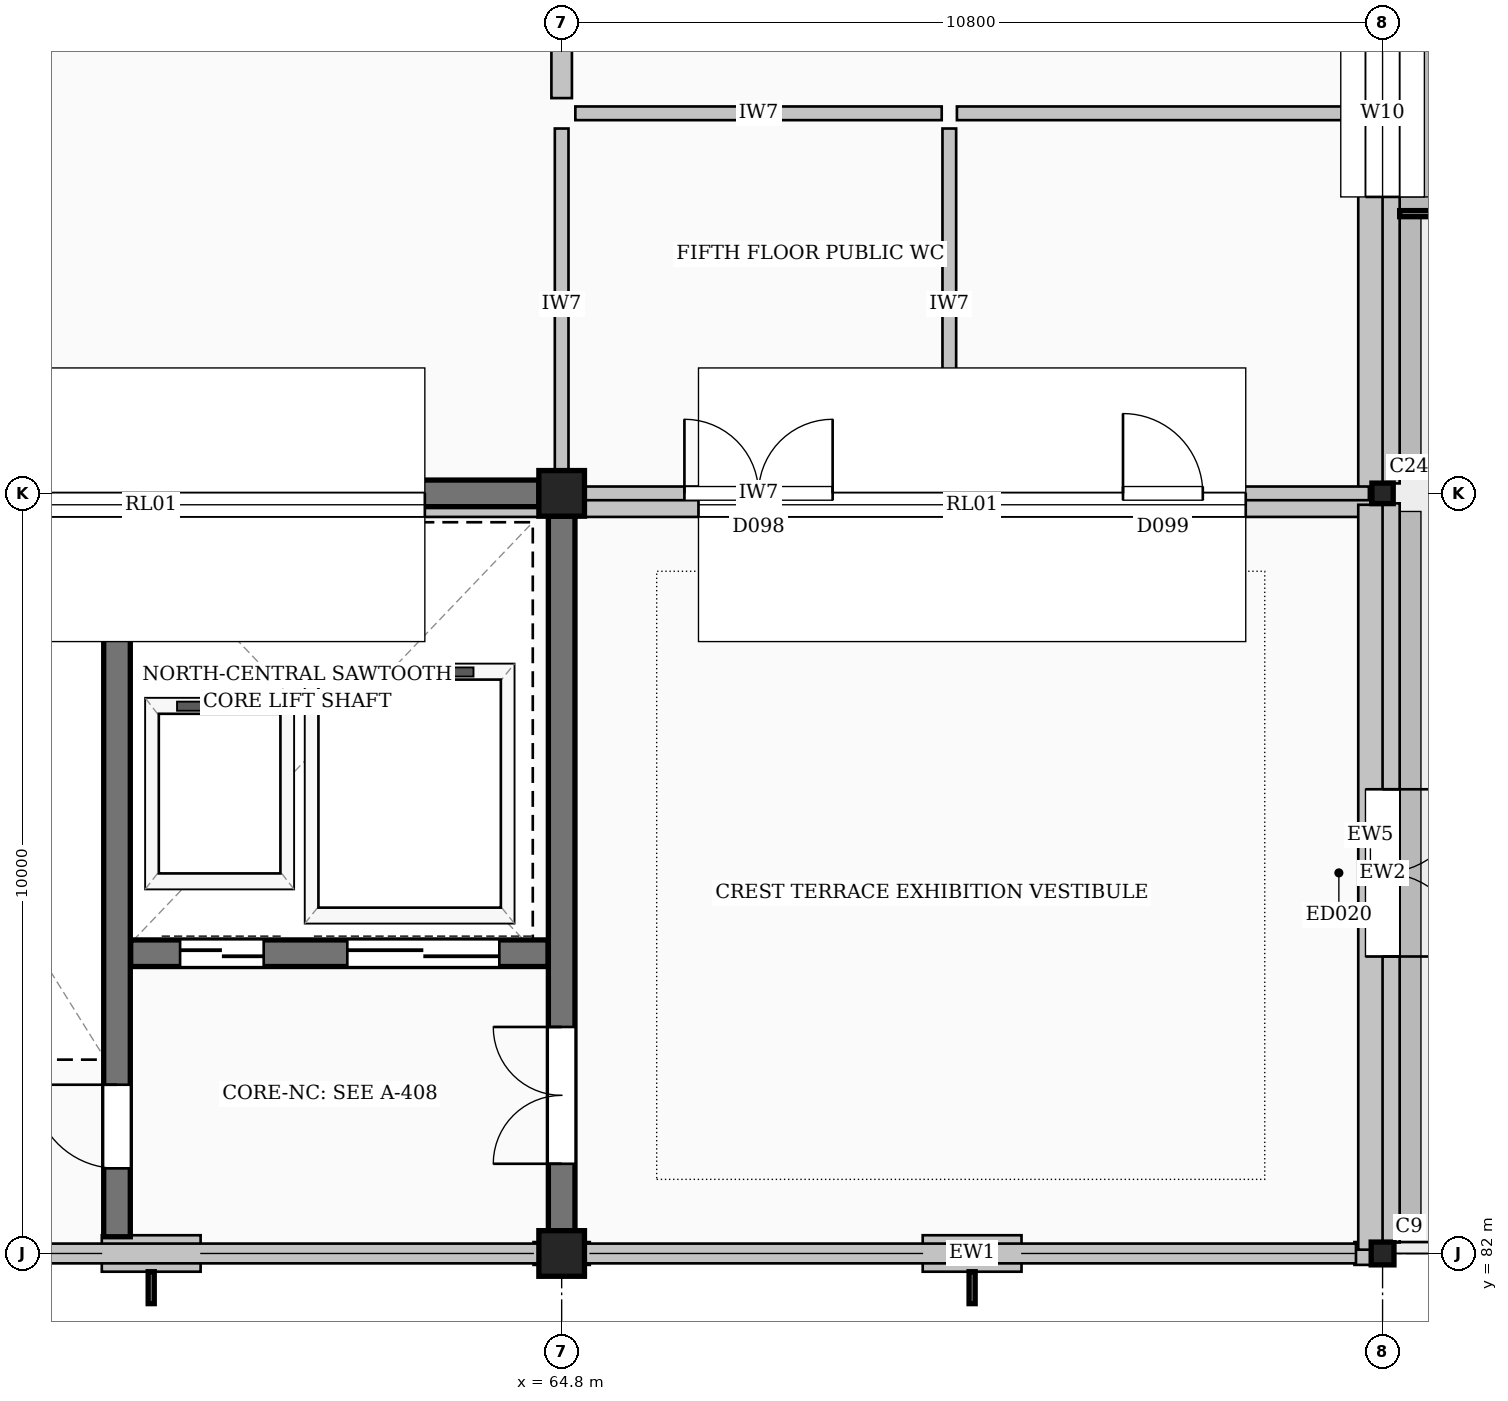
"""IFC4 building model, lengths in metres.
Left out: names, types, materials, properties, quantities, classifications, styles, units other than length and angle.
Written with IfcOpenShell. Run it as: python <this file> out.ifc"""

import sys

from ifc_helpers import new_model, si_unit, direction, frame, frame_2d, origin, origin_2d, place, context, subcontext, project, spatial, polyline, rectangle, hollow_rectangle, i_section, outline, extrude, element, fill, save


model = new_model("IFC4")
c1 = context("Model", 3, precision=1e-05, world=origin(), true_north=direction((0.0, 1.0)))
c2 = subcontext(c1, "Body", "Model", "MODEL_VIEW")
j1 = project(units=[si_unit("LENGTHUNIT", "METRE"), si_unit("PLANEANGLEUNIT", "RADIAN")], contexts=[c1])
p1 = place(None, origin())
s1 = spatial("IfcSite", under=j1, at=p1, CompositionType="ELEMENT")
p2 = place(p1, origin())
s2 = spatial("IfcBuilding", under=s1, at=p2, CompositionType="ELEMENT")
p3 = place(p2, frame((0.0, 0.0, 28.8)))
s3 = spatial("IfcBuildingStorey", under=s2, at=p3, CompositionType="ELEMENT", Elevation=28.8)
for number, where, z_axis, x_axis in (
    (1, (64.8, 82.0, 0.0), (0.0, 0.0, 1.0), (1.0, 0.0, 0.0)),
    (2, (64.8, 92.0, 0.0), (0.0, 0.0, 1.0), (1.0, 0.0, 0.0)),
):
    element("IfcColumn", number, at=place(p3, frame(where, z_axis=z_axis, x_axis=x_axis)), inside=s3, PredefinedType="COLUMN", context=c2, shape_type="SweptSolid", body=[
        extrude(rectangle(XDim=0.6, YDim=0.6, at=origin_2d()), origin(), (0.0, 0.0, 1.0), 5.4),
    ])
p4 = place(p3, frame((75.6, 82.0, 0.0), z_axis=(0.0, 0.0, 1.0), x_axis=(1.0, 0.0, 0.0)))
e3 = element("IfcColumn", 3, at=p4, inside=s3, PredefinedType="COLUMN", context=c2, shape_type="SweptSolid", body=[
    extrude(hollow_rectangle(XDim=0.3, YDim=0.3, WallThickness=0.016, InnerFilletRadius=0.016, OuterFilletRadius=0.032, at=origin_2d()), origin(), (0.0, 0.0, 1.0), 5.4),
])
p5 = place(p3, frame((75.6, 92.0, 0.0), z_axis=(0.0, 0.0, 1.0), x_axis=(1.0, 0.0, 0.0)))
e4 = element("IfcColumn", 4, at=p5, inside=s3, PredefinedType="COLUMN", context=c2, shape_type="SweptSolid", body=[
    extrude(i_section(OverallWidth=0.28, OverallDepth=0.27, WebThickness=0.008, FlangeThickness=0.013, FilletRadius=0.024, at=origin_2d()), origin(), (0.0, 0.0, 1.0), 5.4),
])
p6 = place(p3, frame((75.6, 82.145, 0.0), z_axis=(0.0, 0.0, 1.0), x_axis=(0.0, 1.0, 0.0)))
e5 = element("IfcWall", 5, at=p6, inside=s3, PredefinedType="STANDARD", context=c2, shape_type="SweptSolid", body=[
    extrude(rectangle(XDim=9.724, YDim=0.45, at=frame_2d((4.862, 0.0))), origin(), (0.0, 0.0, 1.0), 5.16),
])
p7 = place(p6, frame((3.762, 0.0, 0.0)))
e6 = element("IfcOpeningElement", 6, at=p7, cuts=e5, PredefinedType="OPENING", context=c2, shape_type="SweptSolid", body=[
    extrude(rectangle(XDim=2.2, YDim=2.4, at=frame_2d((1.1, 1.2))), frame((0.0, 0.235, 0.0), z_axis=(0.0, -1.0, 0.0), x_axis=(1.0, 0.0, 0.0)), (0.0, 0.0, 1.0), 0.47),
])
p8 = place(p3, frame((75.6, 92.131, 0.0), z_axis=(0.0, 0.0, 1.0), x_axis=(0.0, 1.0, 0.0)))
e7 = element("IfcWall", 7, at=p8, inside=s3, PredefinedType="STANDARD", context=c2, shape_type="SweptSolid", body=[
    extrude(rectangle(XDim=9.738, YDim=0.45, at=frame_2d((4.869, 0.0))), origin(), (0.0, 0.0, 1.0), 5.16),
])
p9 = place(p8, frame((3.769, 0.0, 1.0)))
e8 = element("IfcOpeningElement", 8, at=p9, cuts=e7, PredefinedType="OPENING", context=c2, shape_type="SweptSolid", body=[
    extrude(rectangle(XDim=2.2, YDim=3.0, at=frame_2d((1.1, 1.5))), frame((0.0, 0.235, 0.0), z_axis=(0.0, -1.0, 0.0), x_axis=(1.0, 0.0, 0.0)), (0.0, 0.0, 1.0), 0.47),
])
p10 = place(p3, frame((58.75, 82.0, 0.0), z_axis=(0.0, 0.0, 1.0), x_axis=(1.0, 0.0, 0.0)))
e9 = element("IfcWall", 9, at=p10, inside=s3, PredefinedType="STANDARD", context=c2, shape_type="SweptSolid", body=[
    extrude(rectangle(XDim=1.3, YDim=0.48, at=frame_2d((0.65, 0.0))), origin(), (0.0, 0.0, 1.0), 5.044),
])
p11 = place(p3, frame((64.43, 82.0, 0.0), z_axis=(0.0, 0.0, 1.0), x_axis=(1.0, 0.0, 0.0)))
e10 = element("IfcWall", 10, at=p11, inside=s3, PredefinedType="STANDARD", context=c2, shape_type="SweptSolid", body=[
    extrude(rectangle(XDim=0.225, YDim=0.3, at=frame_2d((0.113, 0.0))), origin(), (0.0, 0.0, 1.0), 5.16),
])
p12 = place(p3, frame((69.55, 82.0, 0.0), z_axis=(0.0, 0.0, 1.0), x_axis=(1.0, 0.0, 0.0)))
e11 = element("IfcWall", 11, at=p12, inside=s3, PredefinedType="STANDARD", context=c2, shape_type="SweptSolid", body=[
    extrude(rectangle(XDim=1.3, YDim=0.48, at=frame_2d((0.65, 0.0))), origin(), (0.0, 0.0, 1.0), 5.044),
])
p13 = place(p3, frame((64.945, 82.0, 0.0), z_axis=(0.0, 0.0, 1.0), x_axis=(1.0, 0.0, 0.0)))
e12 = element("IfcWall", 12, at=p13, inside=s3, PredefinedType="STANDARD", context=c2, shape_type="SweptSolid", body=[
    extrude(rectangle(XDim=0.225, YDim=0.3, at=frame_2d((0.112, 0.0))), origin(), (0.0, 0.0, 1.0), 5.16),
])
p14 = place(p3, frame((75.23, 82.0, 0.0), z_axis=(0.0, 0.0, 1.0), x_axis=(1.0, 0.0, 0.0)))
e13 = element("IfcWall", 13, at=p14, inside=s3, PredefinedType="STANDARD", context=c2, shape_type="SweptSolid", body=[
    extrude(rectangle(XDim=0.225, YDim=0.3, at=frame_2d((0.113, 0.0))), origin(), (0.0, 0.0, 1.0), 5.16),
])
p15 = place(p3, frame((54.16, 91.85, 5.4), z_axis=(0.0, 0.0, 1.0), x_axis=(1.0, 0.0, 0.0)))
e14 = element("IfcWall", 14, at=p15, inside=s3, PredefinedType="STANDARD", context=c2, shape_type="SweptSolid", body=[
    extrude(rectangle(XDim=10.48, YDim=0.32, at=frame_2d((5.24, 0.0))), origin(), (0.0, 0.0, 1.0), 2.45),
])
p16 = place(p15, frame((1.64, 0.0, 0.45)))
e15 = element("IfcOpeningElement", 15, at=p16, cuts=e14, PredefinedType="OPENING", context=c2, shape_type="SweptSolid", body=[
    extrude(rectangle(XDim=7.2, YDim=1.5, at=frame_2d((3.6, 0.75))), frame((0.0, 0.17, 0.0), z_axis=(0.0, -1.0, 0.0), x_axis=(1.0, 0.0, 0.0)), (0.0, 0.0, 1.0), 0.34),
])
p17 = place(p3, frame((64.96, 91.85, 5.4), z_axis=(0.0, 0.0, 1.0), x_axis=(1.0, 0.0, 0.0)))
e16 = element("IfcWall", 16, at=p17, inside=s3, PredefinedType="STANDARD", context=c2, shape_type="SweptSolid", body=[
    extrude(rectangle(XDim=10.48, YDim=0.32, at=frame_2d((5.24, 0.0))), origin(), (0.0, 0.0, 1.0), 2.45),
])
p18 = place(p17, frame((1.64, 0.0, 0.45)))
e17 = element("IfcOpeningElement", 17, at=p18, cuts=e16, PredefinedType="OPENING", context=c2, shape_type="SweptSolid", body=[
    extrude(rectangle(XDim=7.2, YDim=1.5, at=frame_2d((3.6, 0.75))), frame((0.0, 0.17, 0.0), z_axis=(0.0, -1.0, 0.0), x_axis=(1.0, 0.0, 0.0)), (0.0, 0.0, 1.0), 0.34),
])
for number, where, z_axis, x_axis in (
    (18, (75.44, 82.05, 5.4), (0.0, 0.0, 1.0), (0.0, 1.0, 0.0)),
    (19, (75.44, 92.05, 5.4), (0.0, 0.0, 1.0), (0.0, 1.0, 0.0)),
):
    element("IfcWall", number, at=place(p3, frame(where, z_axis=z_axis, x_axis=x_axis)), inside=s3, PredefinedType="STANDARD", context=c2, shape_type="SweptSolid", body=[
        extrude(outline(polyline([(0.0, 0.0), (9.8, 0.0), (9.8, 2.55), (0.0, 0.15), (0.0, 0.0)])), frame((0.0, 0.16, 0.0), z_axis=(0.0, -1.0, 0.0), x_axis=(1.0, 0.0, 0.0)), (0.0, 0.0, 1.0), 0.32),
    ])
p19 = place(p3, frame((0.35, 82.0, 5.22), z_axis=(0.0, 0.0, 1.0), x_axis=(1.0, 0.0, 0.0)))
e20 = element("IfcWall", 20, at=p19, inside=s3, PredefinedType="PARAPET", context=c2, shape_type="SweptSolid", body=[
    extrude(rectangle(XDim=74.9, YDim=0.26, at=frame_2d((37.45, 0.0))), origin(), (0.0, 0.0, 1.0), 0.55),
])
p20 = place(p3, frame((54.3, 92.0, 0.0), z_axis=(0.0, 0.0, 1.0), x_axis=(1.0, 0.0, 0.0)))
e21 = element("IfcWall", 21, at=p20, inside=s3, PredefinedType="SHEAR", context=c2, shape_type="SweptSolid", body=[
    extrude(rectangle(XDim=10.2, YDim=0.35, at=frame_2d((5.1, 0.0))), origin(), (0.0, 0.0, 1.0), 5.16),
])
p21 = place(p3, frame((64.8, 82.3, 0.0), z_axis=(0.0, 0.0, 1.0), x_axis=(0.0, 1.0, 0.0)))
e22 = element("IfcWall", 22, at=p21, inside=s3, PredefinedType="SHEAR", context=c2, shape_type="SweptSolid", body=[
    extrude(rectangle(XDim=9.4, YDim=0.35, at=frame_2d((4.7, 0.0))), origin(), (0.0, 0.0, 1.0), 5.16),
])
p22 = place(p21, frame((0.88, 0.0, 0.0)))
e23 = element("IfcOpeningElement", 23, at=p22, cuts=e22, PredefinedType="OPENING", context=c2, shape_type="SweptSolid", body=[
    extrude(rectangle(XDim=1.8, YDim=2.25, at=frame_2d((0.9, 1.125))), frame((0.0, 0.185, 0.0), z_axis=(0.0, -1.0, 0.0), x_axis=(1.0, 0.0, 0.0)), (0.0, 0.0, 1.0), 0.37),
])
p23 = place(p3, frame((58.95, 82.22, 0.0), z_axis=(0.0, 0.0, 1.0), x_axis=(0.0, 1.0, 0.0)))
e24 = element("IfcWall", 24, at=p23, inside=s3, PredefinedType="SHEAR", context=c2, shape_type="SweptSolid", body=[
    extrude(rectangle(XDim=9.605, YDim=0.35, at=frame_2d((4.802, 0.0))), origin(), (0.0, 0.0, 1.0), 5.16),
])
p24 = place(p23, frame((0.9, 0.0, 0.0)))
e25 = element("IfcOpeningElement", 25, at=p24, cuts=e24, PredefinedType="OPENING", context=c2, shape_type="SweptSolid", body=[
    extrude(rectangle(XDim=1.1, YDim=2.2, at=frame_2d((0.55, 1.1))), frame((0.0, 0.185, 0.0), z_axis=(0.0, -1.0, 0.0), x_axis=(1.0, 0.0, 0.0)), (0.0, 0.0, 1.0), 0.37),
])
p25 = place(p3, frame((59.13, 85.95, 0.0), z_axis=(0.0, 0.0, 1.0), x_axis=(1.0, 0.0, 0.0)))
e26 = element("IfcWall", 26, at=p25, inside=s3, PredefinedType="SHEAR", context=c2, shape_type="SweptSolid", body=[
    extrude(rectangle(XDim=5.49, YDim=0.35, at=frame_2d((2.745, 0.0))), origin(), (0.0, 0.0, 1.0), 5.16),
])
p26 = place(p25, frame((0.65, 0.0, 0.0)))
e27 = element("IfcOpeningElement", 27, at=p26, cuts=e26, PredefinedType="OPENING", context=c2, shape_type="SweptSolid", body=[
    extrude(rectangle(XDim=1.1, YDim=2.2, at=frame_2d((0.55, 1.1))), frame((0.0, 0.185, 0.0), z_axis=(0.0, -1.0, 0.0), x_axis=(1.0, 0.0, 0.0)), (0.0, 0.0, 1.0), 0.37),
])
p27 = place(p25, frame((2.85, 0.0, 0.0)))
e28 = element("IfcOpeningElement", 28, at=p27, cuts=e26, PredefinedType="OPENING", context=c2, shape_type="SweptSolid", body=[
    extrude(rectangle(XDim=2.0, YDim=2.5, at=frame_2d((1.0, 1.25))), frame((0.0, 0.185, 0.0), z_axis=(0.0, -1.0, 0.0), x_axis=(1.0, 0.0, 0.0)), (0.0, 0.0, 1.0), 0.37),
])
p28 = place(p3, frame((64.98, 92.0, 0.0), z_axis=(0.0, 0.0, 1.0), x_axis=(1.0, 0.0, 0.0)))
e29 = element("IfcWall", 29, at=p28, inside=s3, PredefinedType="PLUMBINGWALL", context=c2, shape_type="SweptSolid", body=[
    extrude(rectangle(XDim=4.82, YDim=0.18, at=frame_2d((2.41, 0.0))), origin(), (0.0, 0.0, 1.0), 5.044),
])
p29 = place(p28, frame((1.435, 0.0, 0.0)))
e30 = element("IfcOpeningElement", 30, at=p29, cuts=e29, PredefinedType="OPENING", context=c2, shape_type="SweptSolid", body=[
    extrude(rectangle(XDim=1.95, YDim=2.5, at=frame_2d((0.975, 1.25))), frame((0.0, 0.1, 0.0), z_axis=(0.0, -1.0, 0.0), x_axis=(1.0, 0.0, 0.0)), (0.0, 0.0, 1.0), 0.2),
])
p30 = place(p3, frame((70.0, 92.0, 0.0), z_axis=(0.0, 0.0, 1.0), x_axis=(1.0, 0.0, 0.0)))
e31 = element("IfcWall", 31, at=p30, inside=s3, PredefinedType="PLUMBINGWALL", context=c2, shape_type="SweptSolid", body=[
    extrude(rectangle(XDim=5.42, YDim=0.18, at=frame_2d((2.71, 0.0))), origin(), (0.0, 0.0, 1.0), 5.044),
])
p31 = place(p30, frame((2.185, 0.0, 0.0)))
e32 = element("IfcOpeningElement", 32, at=p31, cuts=e31, PredefinedType="OPENING", context=c2, shape_type="SweptSolid", body=[
    extrude(rectangle(XDim=1.05, YDim=2.15, at=frame_2d((0.525, 1.075))), frame((0.0, 0.1, 0.0), z_axis=(0.0, -1.0, 0.0), x_axis=(1.0, 0.0, 0.0)), (0.0, 0.0, 1.0), 0.2),
])
p32 = place(p3, frame((64.8, 97.2, 0.0), z_axis=(0.0, 0.0, 1.0), x_axis=(0.0, 1.0, 0.0)))
e33 = element("IfcWall", 33, at=p32, inside=s3, PredefinedType="PARTITIONING", context=c2, shape_type="SweptSolid", body=[
    extrude(rectangle(XDim=4.6, YDim=0.27, at=frame_2d((2.3, 0.0))), origin(), (0.0, 0.0, 1.0), 5.12),
])
p33 = place(p3, frame((64.98, 97.0, 0.0), z_axis=(0.0, 0.0, 1.0), x_axis=(1.0, 0.0, 0.0)))
e34 = element("IfcWall", 34, at=p33, inside=s3, PredefinedType="PLUMBINGWALL", context=c2, shape_type="SweptSolid", body=[
    extrude(rectangle(XDim=4.82, YDim=0.18, at=frame_2d((2.41, 0.0))), origin(), (0.0, 0.0, 1.0), 5.12),
])
p34 = place(p3, frame((70.0, 97.0, 0.0), z_axis=(0.0, 0.0, 1.0), x_axis=(1.0, 0.0, 0.0)))
e35 = element("IfcWall", 35, at=p34, inside=s3, PredefinedType="PLUMBINGWALL", context=c2, shape_type="SweptSolid", body=[
    extrude(rectangle(XDim=5.42, YDim=0.18, at=frame_2d((2.71, 0.0))), origin(), (0.0, 0.0, 1.0), 5.12),
])
for number, where, z_axis, x_axis in (
    (36, (64.8, 92.18, 0.0), (0.0, 0.0, 1.0), (0.0, 1.0, 0.0)),
    (37, (69.9, 92.18, 0.0), (0.0, 0.0, 1.0), (0.0, 1.0, 0.0)),
):
    element("IfcWall", number, at=place(p3, frame(where, z_axis=z_axis, x_axis=x_axis)), inside=s3, PredefinedType="PLUMBINGWALL", context=c2, shape_type="SweptSolid", body=[
        extrude(rectangle(XDim=4.62, YDim=0.18, at=frame_2d((2.31, 0.0))), origin(), (0.0, 0.0, 1.0), 5.12),
    ])
p35 = place(p7, frame((2.2, 0.0, 0.0), z_axis=(0.0, 0.0, 1.0), x_axis=(-1.0, 0.0, 0.0)))
e38 = element("IfcDoor", 38, at=p35, inside=s3, OperationType="DOUBLE_DOOR_SINGLE_SWING", PredefinedType="DOOR", context=c2, shape_type="SweptSolid", body=[
    extrude(rectangle(XDim=2.2, YDim=2.4, at=frame_2d((1.1, 1.2))), frame((0.0, 0.025, 0.0), z_axis=(0.0, -1.0, 0.0), x_axis=(1.0, 0.0, 0.0)), (0.0, 0.0, 1.0), 0.05),
])
fill(e6, e38)
p36 = place(p9, origin())
e39 = element("IfcWindow", 39, at=p36, inside=s3, PartitioningType="SINGLE_PANEL", PredefinedType="WINDOW", context=c2, shape_type="SweptSolid", body=[
    extrude(rectangle(XDim=2.2, YDim=3.0, at=frame_2d((1.1, 1.5))), frame((0.0, 0.03, 0.0), z_axis=(0.0, -1.0, 0.0), x_axis=(1.0, 0.0, 0.0)), (0.0, 0.0, 1.0), 0.06),
])
fill(e8, e39)
p37 = place(p16, origin())
e40 = element("IfcWindow", 40, at=p37, inside=s3, PartitioningType="SINGLE_PANEL", PredefinedType="SKYLIGHT", context=c2, shape_type="SweptSolid", body=[
    extrude(rectangle(XDim=7.2, YDim=1.5, at=frame_2d((3.6, 0.75))), frame((0.0, 0.03, 0.0), z_axis=(0.0, -1.0, 0.0), x_axis=(1.0, 0.0, 0.0)), (0.0, 0.0, 1.0), 0.06),
])
fill(e15, e40)
p38 = place(p18, origin())
e41 = element("IfcWindow", 41, at=p38, inside=s3, PartitioningType="SINGLE_PANEL", PredefinedType="SKYLIGHT", context=c2, shape_type="SweptSolid", body=[
    extrude(rectangle(XDim=7.2, YDim=1.5, at=frame_2d((3.6, 0.75))), frame((0.0, 0.03, 0.0), z_axis=(0.0, -1.0, 0.0), x_axis=(1.0, 0.0, 0.0)), (0.0, 0.0, 1.0), 0.06),
])
fill(e17, e41)
p39 = place(p24, origin())
e42 = element("IfcDoor", 42, at=p39, inside=s3, OperationType="SINGLE_SWING_RIGHT", PredefinedType="DOOR", context=c2, shape_type="SweptSolid", body=[
    extrude(rectangle(XDim=1.1, YDim=2.2, at=frame_2d((0.55, 1.1))), frame((0.0, 0.025, 0.0), z_axis=(0.0, -1.0, 0.0), x_axis=(1.0, 0.0, 0.0)), (0.0, 0.0, 1.0), 0.05),
])
fill(e25, e42)
p40 = place(p22, origin())
e43 = element("IfcDoor", 43, at=p40, inside=s3, OperationType="DOUBLE_DOOR_SINGLE_SWING", PredefinedType="DOOR", context=c2, shape_type="SweptSolid", body=[
    extrude(rectangle(XDim=1.8, YDim=2.25, at=frame_2d((0.9, 1.125))), frame((0.0, 0.025, 0.0), z_axis=(0.0, -1.0, 0.0), x_axis=(1.0, 0.0, 0.0)), (0.0, 0.0, 1.0), 0.05),
])
fill(e23, e43)
p41 = place(p26, origin())
e44 = element("IfcDoor", 44, at=p41, inside=s3, OperationType="DOUBLE_DOOR_SLIDING", PredefinedType="DOOR", context=c2, shape_type="SweptSolid", body=[
    extrude(rectangle(XDim=1.1, YDim=2.2, at=frame_2d((0.55, 1.1))), frame((0.0, 0.025, 0.0), z_axis=(0.0, -1.0, 0.0), x_axis=(1.0, 0.0, 0.0)), (0.0, 0.0, 1.0), 0.05),
])
fill(e27, e44)
p42 = place(p27, origin())
e45 = element("IfcDoor", 45, at=p42, inside=s3, OperationType="DOUBLE_DOOR_SLIDING", PredefinedType="DOOR", context=c2, shape_type="SweptSolid", body=[
    extrude(rectangle(XDim=2.0, YDim=2.5, at=frame_2d((1.0, 1.25))), frame((0.0, 0.025, 0.0), z_axis=(0.0, -1.0, 0.0), x_axis=(1.0, 0.0, 0.0)), (0.0, 0.0, 1.0), 0.05),
])
fill(e28, e45)
p43 = place(p29, origin())
e46 = element("IfcDoor", 46, at=p43, inside=s3, OperationType="DOUBLE_DOOR_SINGLE_SWING", PredefinedType="DOOR", context=c2, shape_type="SweptSolid", body=[
    extrude(rectangle(XDim=1.95, YDim=2.5, at=frame_2d((0.975, 1.25))), frame((0.0, 0.025, 0.0), z_axis=(0.0, -1.0, 0.0), x_axis=(1.0, 0.0, 0.0)), (0.0, 0.0, 1.0), 0.05),
])
fill(e30, e46)
p44 = place(p31, origin())
e47 = element("IfcDoor", 47, at=p44, inside=s3, OperationType="SINGLE_SWING_LEFT", PredefinedType="DOOR", context=c2, shape_type="SweptSolid", body=[
    extrude(rectangle(XDim=1.05, YDim=2.15, at=frame_2d((0.525, 1.075))), frame((0.0, 0.025, 0.0), z_axis=(0.0, -1.0, 0.0), x_axis=(1.0, 0.0, 0.0)), (0.0, 0.0, 1.0), 0.05),
])
fill(e32, e47)
save(model, sys.argv[1])
